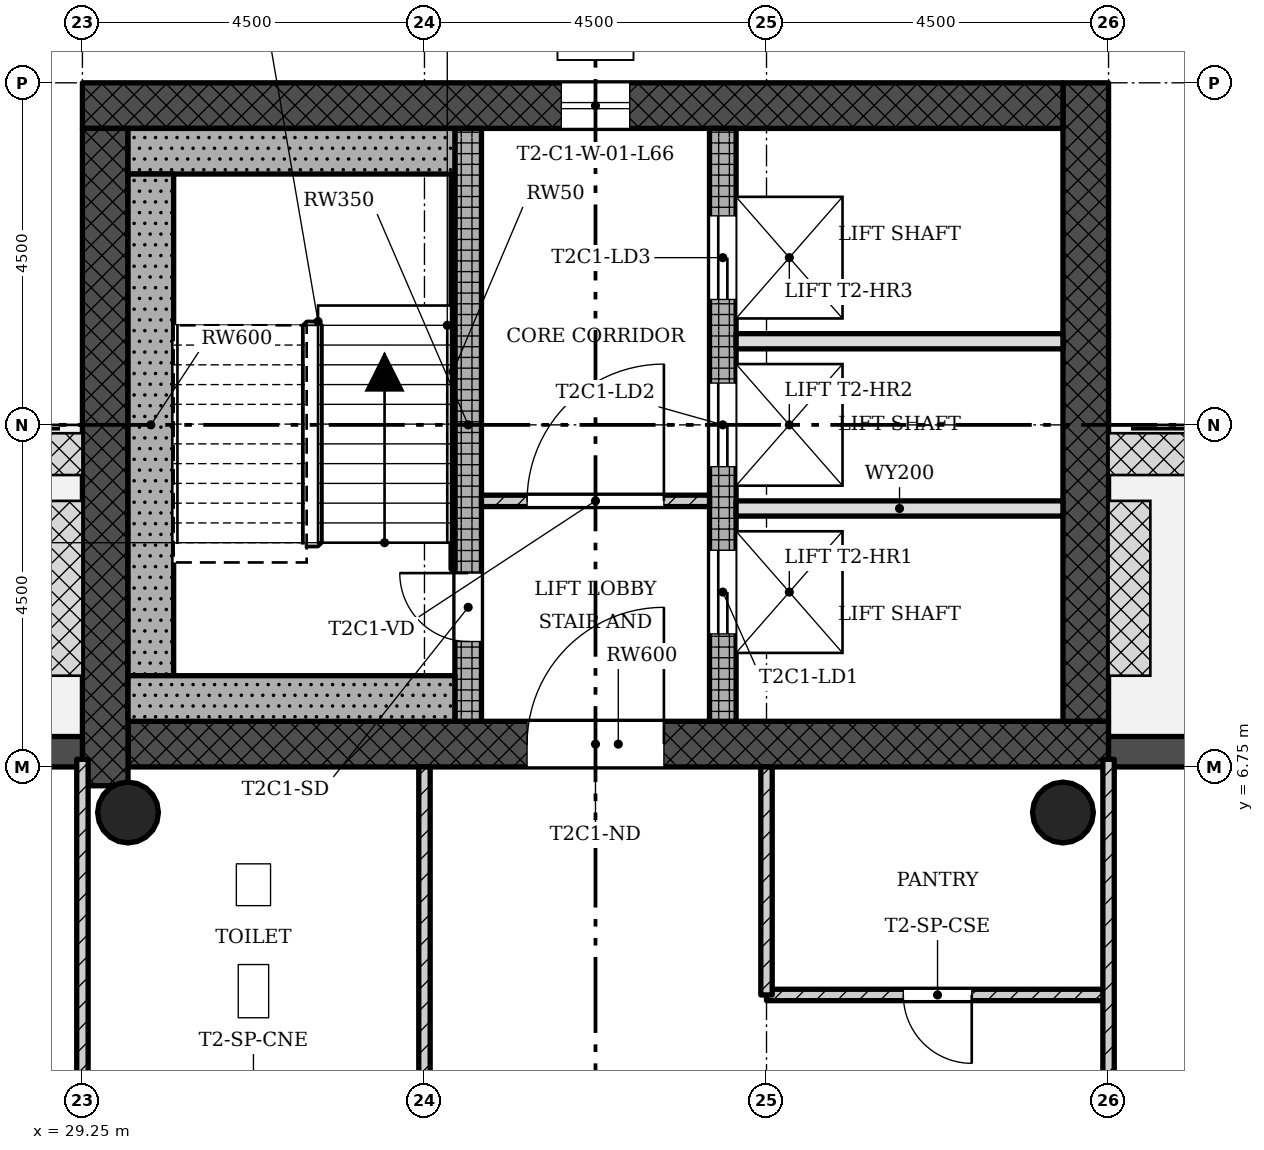
"""IFC4 building model, lengths in metres.
Left out: names, types, materials, properties, quantities, classifications, styles, units other than length and angle.
Written with IfcOpenShell. Run it as: python <this file> out.ifc"""

import sys

from ifc_helpers import new_model, si_unit, direction, frame, frame_2d, origin, origin_2d, place, context, subcontext, project, spatial, rectangle, hollow_circle, extrude, element, fill, save


model = new_model("IFC4")
c1 = context("Model", 3, precision=1e-05, world=origin(), true_north=direction((0.0, 1.0)))
c2 = subcontext(c1, "Body", "Model", "MODEL_VIEW")
j1 = project(units=[si_unit("LENGTHUNIT", "METRE"), si_unit("PLANEANGLEUNIT", "RADIAN")], contexts=[c1])
p1 = place(None, origin())
s1 = spatial("IfcSite", under=j1, at=p1, CompositionType="ELEMENT")
p2 = place(p1, origin())
s2 = spatial("IfcBuilding", under=s1, at=p2, CompositionType="ELEMENT")
p3 = place(p2, frame((0.0, 0.0, 237.9)))
s3 = spatial("IfcBuildingStorey", under=s2, at=p3, CompositionType="ELEMENT", Elevation=237.9)
p4 = place(p3, frame((29.85, 7.05, 0.0), z_axis=(0.0, 0.0, 1.0), x_axis=(1.0, 0.0, 0.0)))
e1 = element("IfcWall", 1, at=p4, inside=s3, PredefinedType="SHEAR", context=c2, shape_type="SweptSolid", body=[
    extrude(rectangle(XDim=12.9, YDim=0.6, at=frame_2d((6.45, 0.0))), origin(), (0.0, 0.0, 1.0), 4.5),
])
p5 = place(p4, frame((5.25, 0.0, 0.0)))
e2 = element("IfcOpeningElement", 2, at=p5, cuts=e1, PredefinedType="OPENING", context=c2, shape_type="SweptSolid", body=[
    extrude(rectangle(XDim=1.8, YDim=2.1, at=frame_2d((0.9, 1.05))), frame((0.0, 0.31, 0.0), z_axis=(0.0, -1.0, 0.0), x_axis=(1.0, 0.0, 0.0)), (0.0, 0.0, 1.0), 0.62),
])
p6 = place(p3, frame((42.45, 7.35, 0.0), z_axis=(0.0, 0.0, 1.0), x_axis=(0.0, 1.0, 0.0)))
e3 = element("IfcWall", 3, at=p6, inside=s3, PredefinedType="SHEAR", context=c2, shape_type="SweptSolid", body=[
    extrude(rectangle(XDim=8.4, YDim=0.6, at=frame_2d((4.2, 0.0))), origin(), (0.0, 0.0, 1.0), 4.5),
])
p7 = place(p3, frame((42.15, 15.45, 0.0), z_axis=(0.0, 0.0, 1.0), x_axis=(-1.0, 0.0, 0.0)))
e4 = element("IfcWall", 4, at=p7, inside=s3, PredefinedType="SHEAR", context=c2, shape_type="SweptSolid", body=[
    extrude(rectangle(XDim=12.9, YDim=0.6, at=frame_2d((6.45, 0.0))), origin(), (0.0, 0.0, 1.0), 4.5),
])
p8 = place(p7, frame((5.7, 0.0, 0.45)))
e5 = element("IfcOpeningElement", 5, at=p8, cuts=e4, PredefinedType="OPENING", context=c2, shape_type="SweptSolid", body=[
    extrude(rectangle(XDim=0.9, YDim=2.4, at=frame_2d((0.45, 1.2))), frame((0.0, 0.31, 0.0), z_axis=(0.0, -1.0, 0.0), x_axis=(1.0, 0.0, 0.0)), (0.0, 0.0, 1.0), 0.62),
])
p9 = place(p3, frame((29.55, 15.15, 0.0), z_axis=(0.0, 0.0, 1.0), x_axis=(0.0, -1.0, 0.0)))
e6 = element("IfcWall", 6, at=p9, inside=s3, PredefinedType="SHEAR", context=c2, shape_type="SweptSolid", body=[
    extrude(rectangle(XDim=8.648, YDim=0.6, at=frame_2d((4.324, 0.0))), origin(), (0.0, 0.0, 1.0), 4.5),
])
p10 = place(p3, frame((34.325, 7.35, 0.0), z_axis=(0.0, 0.0, 1.0), x_axis=(0.0, 1.0, 0.0)))
e7 = element("IfcWall", 7, at=p10, inside=s3, PredefinedType="SHEAR", context=c2, shape_type="SweptSolid", body=[
    extrude(rectangle(XDim=7.8, YDim=0.35, at=frame_2d((3.9, 0.0))), origin(), (0.0, 0.0, 1.0), 4.5),
])
p11 = place(p10, frame((1.05, 0.0, 0.0)))
e8 = element("IfcOpeningElement", 8, at=p11, cuts=e7, PredefinedType="OPENING", context=c2, shape_type="SweptSolid", body=[
    extrude(rectangle(XDim=0.9, YDim=2.1, at=frame_2d((0.45, 1.05))), frame((0.0, 0.185, 0.0), z_axis=(0.0, -1.0, 0.0), x_axis=(1.0, 0.0, 0.0)), (0.0, 0.0, 1.0), 0.37),
])
p12 = place(p3, frame((37.675, 7.35, 0.0), z_axis=(0.0, 0.0, 1.0), x_axis=(0.0, 1.0, 0.0)))
e9 = element("IfcWall", 9, at=p12, inside=s3, PredefinedType="SHEAR", context=c2, shape_type="SweptSolid", body=[
    extrude(rectangle(XDim=7.8, YDim=0.35, at=frame_2d((3.9, 0.0))), origin(), (0.0, 0.0, 1.0), 4.5),
])
p13 = place(p12, frame((1.15, 0.0, 0.0)))
e10 = element("IfcOpeningElement", 10, at=p13, cuts=e9, PredefinedType="OPENING", context=c2, shape_type="SweptSolid", body=[
    extrude(rectangle(XDim=1.1, YDim=2.1, at=frame_2d((0.55, 1.05))), frame((0.0, 0.185, 0.0), z_axis=(0.0, -1.0, 0.0), x_axis=(1.0, 0.0, 0.0)), (0.0, 0.0, 1.0), 0.37),
])
p14 = place(p12, frame((3.35, 0.0, 0.0)))
e11 = element("IfcOpeningElement", 11, at=p14, cuts=e9, PredefinedType="OPENING", context=c2, shape_type="SweptSolid", body=[
    extrude(rectangle(XDim=1.1, YDim=2.1, at=frame_2d((0.55, 1.05))), frame((0.0, 0.185, 0.0), z_axis=(0.0, -1.0, 0.0), x_axis=(1.0, 0.0, 0.0)), (0.0, 0.0, 1.0), 0.37),
])
p15 = place(p12, frame((5.55, 0.0, 0.0)))
e12 = element("IfcOpeningElement", 12, at=p15, cuts=e9, PredefinedType="OPENING", context=c2, shape_type="SweptSolid", body=[
    extrude(rectangle(XDim=1.1, YDim=2.1, at=frame_2d((0.55, 1.05))), frame((0.0, 0.185, 0.0), z_axis=(0.0, -1.0, 0.0), x_axis=(1.0, 0.0, 0.0)), (0.0, 0.0, 1.0), 0.37),
])
for number, where, z_axis, x_axis in (
    (13, (42.15, 6.15, 0.0), (0.0, 0.0, 1.0), (1.0, 0.0, 0.0)),
    (14, (29.85, 6.15, 0.0), (0.0, 0.0, 1.0), (1.0, 0.0, 0.0)),
):
    element("IfcColumn", number, at=place(p3, frame(where, z_axis=z_axis, x_axis=x_axis)), inside=s3, PredefinedType="COLUMN", context=c2, shape_type="SweptSolid", body=[
        extrude(hollow_circle(Radius=0.4, WallThickness=0.028, at=origin_2d()), origin(), (0.0, 0.0, 1.0), 4.5),
    ])
p16 = place(p3, frame((47.25, 6.95, -0.02), z_axis=(0.0, 0.0, 1.0), x_axis=(-1.0, 0.0, 0.0)))
e15 = element("IfcWall", 15, at=p16, inside=s3, PredefinedType="STANDARD", context=c2, shape_type="SweptSolid", body=[
    extrude(rectangle(XDim=4.5, YDim=0.4, at=frame_2d((2.25, 0.0))), origin(), (0.0, 0.0, 1.0), 4.22),
])
p17 = place(p16, frame((1.35, 0.0, 0.02)))
e16 = element("IfcOpeningElement", 16, at=p17, cuts=e15, PredefinedType="OPENING", context=c2, shape_type="SweptSolid", body=[
    extrude(rectangle(XDim=1.8, YDim=2.1, at=frame_2d((0.9, 1.05))), frame((0.0, 0.21, 0.0), z_axis=(0.0, -1.0, 0.0), x_axis=(1.0, 0.0, 0.0)), (0.0, 0.0, 1.0), 0.42),
])
p18 = place(p3, frame((29.25, 6.95, -0.02), z_axis=(0.0, 0.0, 1.0), x_axis=(-1.0, 0.0, 0.0)))
e17 = element("IfcWall", 17, at=p18, inside=s3, PredefinedType="STANDARD", context=c2, shape_type="SweptSolid", body=[
    extrude(rectangle(XDim=4.5, YDim=0.4, at=frame_2d((2.25, 0.0))), origin(), (0.0, 0.0, 1.0), 4.22),
])
p19 = place(p18, frame((1.35, 0.0, 0.02)))
e18 = element("IfcOpeningElement", 18, at=p19, cuts=e17, PredefinedType="OPENING", context=c2, shape_type="SweptSolid", body=[
    extrude(rectangle(XDim=1.8, YDim=2.1, at=frame_2d((0.9, 1.05))), frame((0.0, 0.21, 0.0), z_axis=(0.0, -1.0, 0.0), x_axis=(1.0, 0.0, 0.0)), (0.0, 0.0, 1.0), 0.42),
])
p20 = place(p3, frame((37.5, 10.25, 0.0), z_axis=(0.0, 0.0, 1.0), x_axis=(-1.0, 0.0, 0.0)))
e19 = element("IfcWall", 19, at=p20, inside=s3, PredefinedType="PARTITIONING", context=c2, shape_type="SweptSolid", body=[
    extrude(rectangle(XDim=3.0, YDim=0.15, at=frame_2d((1.5, 0.0))), origin(), (0.0, 0.0, 1.0), 4.1),
])
p21 = place(p20, frame((0.6, 0.0, 0.0)))
e20 = element("IfcOpeningElement", 20, at=p21, cuts=e19, PredefinedType="OPENING", context=c2, shape_type="SweptSolid", body=[
    extrude(rectangle(XDim=1.8, YDim=2.1, at=frame_2d((0.9, 1.05))), frame((0.0, 0.085, 0.0), z_axis=(0.0, -1.0, 0.0), x_axis=(1.0, 0.0, 0.0)), (0.0, 0.0, 1.0), 0.17),
])
for number, where, z_axis, x_axis in (
    (21, (42.15, 10.15, 0.0), (0.0, 0.0, 1.0), (-1.0, 0.0, 0.0)),
    (22, (42.15, 12.35, 0.0), (0.0, 0.0, 1.0), (-1.0, 0.0, 0.0)),
):
    element("IfcWall", number, at=place(p3, frame(where, z_axis=z_axis, x_axis=x_axis)), inside=s3, PredefinedType="SOLIDWALL", context=c2, shape_type="SweptSolid", body=[
        extrude(rectangle(XDim=4.3, YDim=0.2, at=frame_2d((2.15, 0.0))), origin(), (0.0, 0.0, 1.0), 4.1),
    ])
p22 = place(p3, frame((33.75, 2.25, 0.0), z_axis=(0.0, 0.0, 1.0), x_axis=(0.0, 1.0, 0.0)))
e23 = element("IfcWall", 23, at=p22, inside=s3, PredefinedType="PARTITIONING", context=c2, shape_type="SweptSolid", body=[
    extrude(rectangle(XDim=4.5, YDim=0.15, at=frame_2d((2.25, 0.0))), origin(), (0.0, 0.0, 1.0), 4.1),
])
p23 = place(p3, frame((42.75, 3.75, 0.0), z_axis=(0.0, 0.0, 1.0), x_axis=(-1.0, 0.0, 0.0)))
e24 = element("IfcWall", 24, at=p23, inside=s3, PredefinedType="PARTITIONING", context=c2, shape_type="SweptSolid", body=[
    extrude(rectangle(XDim=4.5, YDim=0.15, at=frame_2d((2.25, 0.0))), origin(), (0.0, 0.0, 1.0), 4.1),
])
p24 = place(p23, frame((1.8, 0.0, 0.0)))
e25 = element("IfcOpeningElement", 25, at=p24, cuts=e24, PredefinedType="OPENING", context=c2, shape_type="SweptSolid", body=[
    extrude(rectangle(XDim=0.9, YDim=2.1, at=frame_2d((0.45, 1.05))), frame((0.0, 0.085, 0.0), z_axis=(0.0, -1.0, 0.0), x_axis=(1.0, 0.0, 0.0)), (0.0, 0.0, 1.0), 0.17),
])
p25 = place(p3, frame((38.25, 3.75, 0.0), z_axis=(0.0, 0.0, 1.0), x_axis=(0.0, 1.0, 0.0)))
e26 = element("IfcWall", 26, at=p25, inside=s3, PredefinedType="PARTITIONING", context=c2, shape_type="SweptSolid", body=[
    extrude(rectangle(XDim=3.0, YDim=0.15, at=frame_2d((1.5, 0.0))), origin(), (0.0, 0.0, 1.0), 4.1),
])
p26 = place(p3, frame((29.25, -6.85, 0.0), z_axis=(0.0, 0.0, 1.0), x_axis=(0.0, 1.0, 0.0)))
e27 = element("IfcWall", 27, at=p26, inside=s3, PredefinedType="PARTITIONING", context=c2, shape_type="SweptSolid", body=[
    extrude(rectangle(XDim=13.7, YDim=0.15, at=frame_2d((6.85, 0.0))), origin(), (0.0, 0.0, 1.0), 4.1),
])
p27 = place(p26, frame((5.95, 0.0, 0.0)))
e28 = element("IfcOpeningElement", 28, at=p27, cuts=e27, PredefinedType="OPENING", context=c2, shape_type="SweptSolid", body=[
    extrude(rectangle(XDim=1.8, YDim=2.1, at=frame_2d((0.9, 1.05))), frame((0.0, 0.085, 0.0), z_axis=(0.0, -1.0, 0.0), x_axis=(1.0, 0.0, 0.0)), (0.0, 0.0, 1.0), 0.17),
])
p28 = place(p3, frame((42.75, -6.85, 0.0), z_axis=(0.0, 0.0, 1.0), x_axis=(0.0, 1.0, 0.0)))
e29 = element("IfcWall", 29, at=p28, inside=s3, PredefinedType="PARTITIONING", context=c2, shape_type="SweptSolid", body=[
    extrude(rectangle(XDim=13.7, YDim=0.15, at=frame_2d((6.85, 0.0))), origin(), (0.0, 0.0, 1.0), 4.1),
])
p29 = place(p28, frame((5.95, 0.0, 0.0)))
e30 = element("IfcOpeningElement", 30, at=p29, cuts=e29, PredefinedType="OPENING", context=c2, shape_type="SweptSolid", body=[
    extrude(rectangle(XDim=1.8, YDim=2.1, at=frame_2d((0.9, 1.05))), frame((0.0, 0.085, 0.0), z_axis=(0.0, -1.0, 0.0), x_axis=(1.0, 0.0, 0.0)), (0.0, 0.0, 1.0), 0.17),
])
p30 = place(p3, frame((34.15, 14.85, 0.0), z_axis=(0.0, 0.0, 1.0), x_axis=(-1.0, 0.0, 0.0)))
e31 = element("IfcWall", 31, at=p30, inside=s3, PredefinedType="SHEAR", context=c2, shape_type="SweptSolid", body=[
    extrude(rectangle(XDim=4.3, YDim=0.6, at=frame_2d((2.15, 0.0))), origin(), (0.0, 0.0, 1.0), 4.5),
])
p31 = place(p3, frame((30.15, 7.95, 0.0), z_axis=(0.0, 0.0, 1.0), x_axis=(0.0, 1.0, 0.0)))
e32 = element("IfcWall", 32, at=p31, inside=s3, PredefinedType="SHEAR", context=c2, shape_type="SweptSolid", body=[
    extrude(rectangle(XDim=6.6, YDim=0.6, at=frame_2d((3.3, 0.0))), origin(), (0.0, 0.0, 1.0), 4.5),
])
p32 = place(p3, frame((34.15, 7.65, 0.0), z_axis=(0.0, 0.0, 1.0), x_axis=(-1.0, 0.0, 0.0)))
e33 = element("IfcWall", 33, at=p32, inside=s3, PredefinedType="SHEAR", context=c2, shape_type="SweptSolid", body=[
    extrude(rectangle(XDim=4.3, YDim=0.6, at=frame_2d((2.15, 0.0))), origin(), (0.0, 0.0, 1.0), 4.5),
])
p33 = place(p3, frame((34.125, 9.35, 0.0), z_axis=(0.0, 0.0, 1.0), x_axis=(0.0, 1.0, 0.0)))
e34 = element("IfcWall", 34, at=p33, inside=s3, PredefinedType="SHEAR", context=c2, shape_type="SweptSolid", body=[
    extrude(rectangle(XDim=5.2, YDim=0.05, at=frame_2d((2.6, 0.0))), origin(), (0.0, 0.0, 1.0), 4.5),
])
p34 = place(p8, origin())
e35 = element("IfcWindow", 35, at=p34, inside=s3, PartitioningType="SINGLE_PANEL", PredefinedType="WINDOW", context=c2, shape_type="SweptSolid", body=[
    extrude(rectangle(XDim=0.9, YDim=2.4, at=frame_2d((0.45, 1.2))), frame((0.0, 0.03, 0.0), z_axis=(0.0, -1.0, 0.0), x_axis=(1.0, 0.0, 0.0)), (0.0, 0.0, 1.0), 0.06),
])
fill(e5, e35)
p35 = place(p21, origin())
e36 = element("IfcDoor", 36, at=p35, inside=s3, OperationType="SINGLE_SWING_LEFT", PredefinedType="DOOR", context=c2, shape_type="SweptSolid", body=[
    extrude(rectangle(XDim=1.8, YDim=2.1, at=frame_2d((0.9, 1.05))), frame((0.0, 0.025, 0.0), z_axis=(0.0, -1.0, 0.0), x_axis=(1.0, 0.0, 0.0)), (0.0, 0.0, 1.0), 0.05),
])
fill(e20, e36)
p36 = place(p24, origin())
e37 = element("IfcDoor", 37, at=p36, inside=s3, OperationType="SINGLE_SWING_RIGHT", PredefinedType="DOOR", context=c2, shape_type="SweptSolid", body=[
    extrude(rectangle(XDim=0.9, YDim=2.1, at=frame_2d((0.45, 1.05))), frame((0.0, 0.025, 0.0), z_axis=(0.0, -1.0, 0.0), x_axis=(1.0, 0.0, 0.0)), (0.0, 0.0, 1.0), 0.05),
])
fill(e25, e37)
p37 = place(p11, origin())
e38 = element("IfcDoor", 38, at=p37, inside=s3, OperationType="SINGLE_SWING_LEFT", PredefinedType="DOOR", context=c2, shape_type="SweptSolid", body=[
    extrude(rectangle(XDim=0.9, YDim=2.1, at=frame_2d((0.45, 1.05))), frame((0.0, 0.025, 0.0), z_axis=(0.0, -1.0, 0.0), x_axis=(1.0, 0.0, 0.0)), (0.0, 0.0, 1.0), 0.05),
])
fill(e8, e38)
p38 = place(p13, origin())
e39 = element("IfcDoor", 39, at=p38, inside=s3, OperationType="SLIDING_TO_LEFT", PredefinedType="DOOR", context=c2, shape_type="SweptSolid", body=[
    extrude(rectangle(XDim=1.1, YDim=2.1, at=frame_2d((0.55, 1.05))), frame((0.0, 0.025, 0.0), z_axis=(0.0, -1.0, 0.0), x_axis=(1.0, 0.0, 0.0)), (0.0, 0.0, 1.0), 0.05),
])
fill(e10, e39)
p39 = place(p14, origin())
e40 = element("IfcDoor", 40, at=p39, inside=s3, OperationType="SLIDING_TO_LEFT", PredefinedType="DOOR", context=c2, shape_type="SweptSolid", body=[
    extrude(rectangle(XDim=1.1, YDim=2.1, at=frame_2d((0.55, 1.05))), frame((0.0, 0.025, 0.0), z_axis=(0.0, -1.0, 0.0), x_axis=(1.0, 0.0, 0.0)), (0.0, 0.0, 1.0), 0.05),
])
fill(e11, e40)
p40 = place(p15, origin())
e41 = element("IfcDoor", 41, at=p40, inside=s3, OperationType="SLIDING_TO_LEFT", PredefinedType="DOOR", context=c2, shape_type="SweptSolid", body=[
    extrude(rectangle(XDim=1.1, YDim=2.1, at=frame_2d((0.55, 1.05))), frame((0.0, 0.025, 0.0), z_axis=(0.0, -1.0, 0.0), x_axis=(1.0, 0.0, 0.0)), (0.0, 0.0, 1.0), 0.05),
])
fill(e12, e41)
p41 = place(p5, origin())
e42 = element("IfcDoor", 42, at=p41, inside=s3, OperationType="SINGLE_SWING_LEFT", PredefinedType="DOOR", context=c2, shape_type="SweptSolid", body=[
    extrude(rectangle(XDim=1.8, YDim=2.1, at=frame_2d((0.9, 1.05))), frame((0.0, 0.025, 0.0), z_axis=(0.0, -1.0, 0.0), x_axis=(1.0, 0.0, 0.0)), (0.0, 0.0, 1.0), 0.05),
])
fill(e2, e42)
save(model, sys.argv[1])
